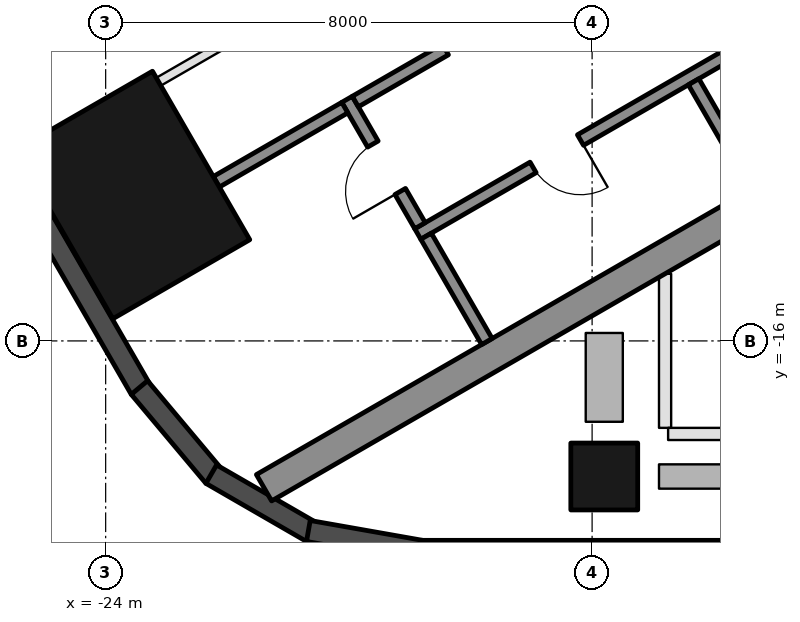
"""IFC4 building model, lengths in metres.
Left out: names, types, materials, properties, quantities, classifications, styles, units other than length and angle.
Written with IfcOpenShell. Run it as: python <this file> out.ifc"""

import sys

from ifc_helpers import new_model, si_unit, direction, frame, frame_2d, origin, origin_2d, place, context, subcontext, project, spatial, rectangle, hollow_rectangle, extrude, boolean, halfspace, element, fill, save


model = new_model("IFC4")
c1 = context("Model", 3, precision=1e-05, world=origin(), true_north=direction((0.0, 1.0)))
c2 = subcontext(c1, "Body", "Model", "MODEL_VIEW")
j1 = project(units=[si_unit("LENGTHUNIT", "METRE"), si_unit("PLANEANGLEUNIT", "RADIAN")], contexts=[c1])
p1 = place(None, origin())
s1 = spatial("IfcSite", under=j1, at=p1, CompositionType="ELEMENT")
p2 = place(p1, origin())
s2 = spatial("IfcBuilding", under=s1, at=p2, CompositionType="ELEMENT")
p3 = place(p2, frame((0.0, 0.0, 37.5)))
s3 = spatial("IfcBuildingStorey", under=s2, at=p3, CompositionType="ELEMENT", Elevation=37.5)
p4 = place(p3, frame((-15.8, -18.23, 0.0), z_axis=(0.0, 0.0, 1.0), x_axis=(-1.0, 0.0, 0.0)))
e1 = element("IfcColumn", 1, at=p4, inside=s3, PredefinedType="COLUMN", context=c2, shape_type="SweptSolid", body=[
    boolean("DIFFERENCE", extrude(hollow_rectangle(XDim=1.1, YDim=1.1, WallThickness=0.05, at=origin_2d()), origin(), (0.0, 0.0, 1.0), 4.5), halfspace(frame((0.0, 0.0, 0.007), z_axis=(0.0, 0.0, 1.0), x_axis=(1.0, 0.0, 0.0)), True)),
])
p5 = place(p3, frame((-23.556, -13.6, 0.0), z_axis=(0.0, 0.0, 1.0), x_axis=(-0.5, 0.866025403784, 0.0)))
e2 = element("IfcColumn", 2, at=p5, inside=s3, PredefinedType="COLUMN", context=c2, shape_type="SweptSolid", body=[
    extrude(hollow_rectangle(XDim=3.2, YDim=2.6, WallThickness=0.08, at=origin_2d()), origin(), (0.0, 0.0, 1.0), 4.5),
])
p6 = place(p3, frame((-26.256, -11.893, 0.0), z_axis=(0.0, 0.0, 1.0), x_axis=(0.499986410639, -0.866033249463, 0.0)))
e3 = element("IfcWall", 3, at=p6, inside=s3, PredefinedType="SOLIDWALL", context=c2, shape_type="SweptSolid", body=[
    extrude(rectangle(XDim=5.658, YDim=0.35, at=frame_2d((2.829, 0.0))), origin(), (0.0, 0.0, 1.0), 4.2),
])
for number, where, z_axis, x_axis in (
    (4, (-23.445, -16.768, 0.0), (0.0, 0.0, 1.0), (0.643, -0.766, 0.0)),
    (5, (-22.264, -18.192, 0.0), (0.0, 0.0, 1.0), (0.866, -0.5, 0.0)),
):
    element("IfcWall", number, at=place(p3, frame(where, z_axis=z_axis, x_axis=x_axis)), inside=s3, PredefinedType="SOLIDWALL", context=c2, shape_type="SweptSolid", body=[
        extrude(rectangle(XDim=1.91, YDim=0.35, at=frame_2d((0.955, 0.0))), origin(), (0.0, 0.0, 1.0), 4.2),
    ])
p7 = place(p3, frame((-20.667, -19.126, 0.0), z_axis=(0.0, 0.0, 1.0), x_axis=(0.984798995425, -0.173697837091, 0.0)))
e6 = element("IfcWall", 6, at=p7, inside=s3, PredefinedType="SOLIDWALL", context=c2, shape_type="SweptSolid", body=[
    extrude(rectangle(XDim=1.91, YDim=0.35, at=frame_2d((0.955, 0.0))), origin(), (0.0, 0.0, 1.0), 4.2),
])
p8 = place(p3, frame((-18.816, -19.455, 0.0), z_axis=(0.0, 0.0, 1.0), x_axis=(1.0, 0.0, 0.0)))
e7 = element("IfcWall", 7, at=p8, inside=s3, PredefinedType="SOLIDWALL", context=c2, shape_type="SweptSolid", body=[
    extrude(rectangle(XDim=37.632, YDim=0.35, at=frame_2d((18.816, 0.0))), origin(), (0.0, 0.0, 1.0), 4.2),
])
p9 = place(p3, frame((-8.547, -10.997, 0.0), z_axis=(0.0, 0.0, 1.0), x_axis=(-0.866025009528, -0.500000682871, 0.0)))
e8 = element("IfcWall", 8, at=p9, inside=s3, PredefinedType="SHEAR", context=c2, shape_type="SweptSolid", body=[
    extrude(rectangle(XDim=14.837, YDim=0.5, at=frame_2d((7.418, 0.0))), origin(), (0.0, 0.0, 1.0), 4.2),
])
p10 = place(p3, frame((-10.068, -9.162, 0.0), z_axis=(0.0, 0.0, 1.0), x_axis=(-0.866032725843, -0.499987317609, 0.0)))
e9 = element("IfcWall", 9, at=p10, inside=s3, PredefinedType="SHEAR", context=c2, shape_type="SweptSolid", body=[
    extrude(rectangle(XDim=10.16, YDim=0.2, at=frame_2d((5.08, 0.0))), origin(), (0.0, 0.0, 1.0), 4.2),
])
p11 = place(p10, frame((1.99, 0.0, 0.0)))
e10 = element("IfcOpeningElement", 10, at=p11, cuts=e9, PredefinedType="OPENING", context=c2, shape_type="SweptSolid", body=[
    extrude(rectangle(XDim=0.9, YDim=2.1, at=frame_2d((0.45, 1.05))), frame((0.0, 0.11, 0.0), z_axis=(0.0, -1.0, 0.0), x_axis=(1.0, 0.0, 0.0)), (0.0, 0.0, 1.0), 0.22),
])
p12 = place(p10, frame((7.07, 0.0, 0.0)))
e11 = element("IfcOpeningElement", 11, at=p12, cuts=e9, PredefinedType="OPENING", context=c2, shape_type="SweptSolid", body=[
    extrude(rectangle(XDim=0.9, YDim=2.1, at=frame_2d((0.45, 1.05))), frame((0.0, 0.11, 0.0), z_axis=(0.0, -1.0, 0.0), x_axis=(1.0, 0.0, 0.0)), (0.0, 0.0, 1.0), 0.22),
])
p13 = place(p3, frame((-20.031, -12.026, 0.0), z_axis=(0.0, 0.0, 1.0), x_axis=(0.500033551112, -0.866006032174, 0.0)))
e12 = element("IfcWall", 12, at=p13, inside=s3, PredefinedType="SHEAR", context=c2, shape_type="SweptSolid", body=[
    extrude(rectangle(XDim=2.4, YDim=0.2, at=frame_2d((1.2, 0.0))), origin(), (0.0, 0.0, 1.0), 4.2),
])
p14 = place(p13, frame((0.85, 0.0, 0.0)))
e13 = element("IfcOpeningElement", 13, at=p14, cuts=e12, PredefinedType="OPENING", context=c2, shape_type="SweptSolid", body=[
    extrude(rectangle(XDim=0.9, YDim=2.1, at=frame_2d((0.45, 1.05))), frame((0.0, 0.11, 0.0), z_axis=(0.0, -1.0, 0.0), x_axis=(1.0, 0.0, 0.0)), (0.0, 0.0, 1.0), 0.22),
])
p15 = place(p3, frame((-18.413, -11.208, 0.0), z_axis=(0.0, 0.0, 1.0), x_axis=(-0.866038183914, -0.499977863513, 0.0)))
e14 = element("IfcWall", 14, at=p15, inside=s3, PredefinedType="SHEAR", context=c2, shape_type="SweptSolid", body=[
    extrude(rectangle(XDim=1.71, YDim=0.2, at=frame_2d((0.855, 0.0))), origin(), (0.0, 0.0, 1.0), 4.2),
])
for number, where, z_axis, x_axis in (
    (15, (-14.331, -11.738, 0.0), (0.0, 0.0, 1.0), (0.5, -0.866, 0.0)),
    (16, (-18.73, -14.278, 0.0), (0.0, 0.0, 1.0), (0.5, -0.866, 0.0)),
):
    element("IfcWall", number, at=place(p3, frame(where, z_axis=z_axis, x_axis=x_axis)), inside=s3, PredefinedType="SHEAR", context=c2, shape_type="SweptSolid", body=[
        extrude(rectangle(XDim=2.0, YDim=0.2, at=frame_2d((1.0, 0.0))), origin(), (0.0, 0.0, 1.0), 4.2),
    ])
p16 = place(p3, frame((-20.067, -12.163, 0.0), z_axis=(0.0, 0.0, 1.0), x_axis=(-0.866048967903, -0.499959183527, 0.0)))
e17 = element("IfcWall", 17, at=p16, inside=s3, PredefinedType="SHEAR", context=c2, shape_type="SweptSolid", body=[
    extrude(rectangle(XDim=2.44, YDim=0.2, at=frame_2d((1.22, 0.0))), origin(), (0.0, 0.0, 1.0), 4.2),
])
p17 = place(p3, frame((-19.363, -9.562, 0.0), z_axis=(0.0, 0.0, 1.0), x_axis=(-0.866027639635, -0.499996127374, 0.0)))
e18 = element("IfcWall", 18, at=p17, inside=s3, PredefinedType="PARTITIONING", context=c2, shape_type="SweptSolid", body=[
    extrude(rectangle(XDim=4.35, YDim=0.15, at=frame_2d((2.175, 0.0))), origin(), (0.0, 0.0, 1.0), 4.2),
])
p18 = place(p3, frame((-14.8, -17.43, 0.0), z_axis=(0.0, 0.0, 1.0), x_axis=(0.0, 1.0, 0.0)))
e19 = element("IfcWall", 19, at=p18, inside=s3, PredefinedType="PARTITIONING", context=c2, shape_type="SweptSolid", body=[
    extrude(rectangle(XDim=2.534, YDim=0.2, at=frame_2d((1.267, 0.0))), origin(), (0.0, 0.0, 1.0), 4.2),
])
p19 = place(p3, frame((-14.75, -17.53, 0.0), z_axis=(0.0, 0.0, 1.0), x_axis=(1.0, 0.0, 0.0)))
e20 = element("IfcWall", 20, at=p19, inside=s3, PredefinedType="PARTITIONING", context=c2, shape_type="SweptSolid", body=[
    extrude(rectangle(XDim=29.5, YDim=0.2, at=frame_2d((14.75, 0.0))), origin(), (0.0, 0.0, 1.0), 3.41),
])
p20 = place(p12, origin())
e21 = element("IfcDoor", 21, at=p20, inside=s3, OperationType="SINGLE_SWING_LEFT", PredefinedType="DOOR", context=c2, shape_type="SweptSolid", body=[
    extrude(rectangle(XDim=0.9, YDim=2.1, at=frame_2d((0.45, 1.05))), frame((0.0, 0.025, 0.0), z_axis=(0.0, -1.0, 0.0), x_axis=(1.0, 0.0, 0.0)), (0.0, 0.0, 1.0), 0.05),
])
fill(e11, e21)
p21 = place(p14, frame((0.9, 0.0, 0.0), z_axis=(0.0, 0.0, 1.0), x_axis=(-1.0, 0.0, 0.0)))
e22 = element("IfcDoor", 22, at=p21, inside=s3, OperationType="SINGLE_SWING_LEFT", PredefinedType="DOOR", context=c2, shape_type="SweptSolid", body=[
    extrude(rectangle(XDim=0.9, YDim=2.1, at=frame_2d((0.45, 1.05))), frame((0.0, 0.025, 0.0), z_axis=(0.0, -1.0, 0.0), x_axis=(1.0, 0.0, 0.0)), (0.0, 0.0, 1.0), 0.05),
])
fill(e13, e22)
save(model, sys.argv[1])
